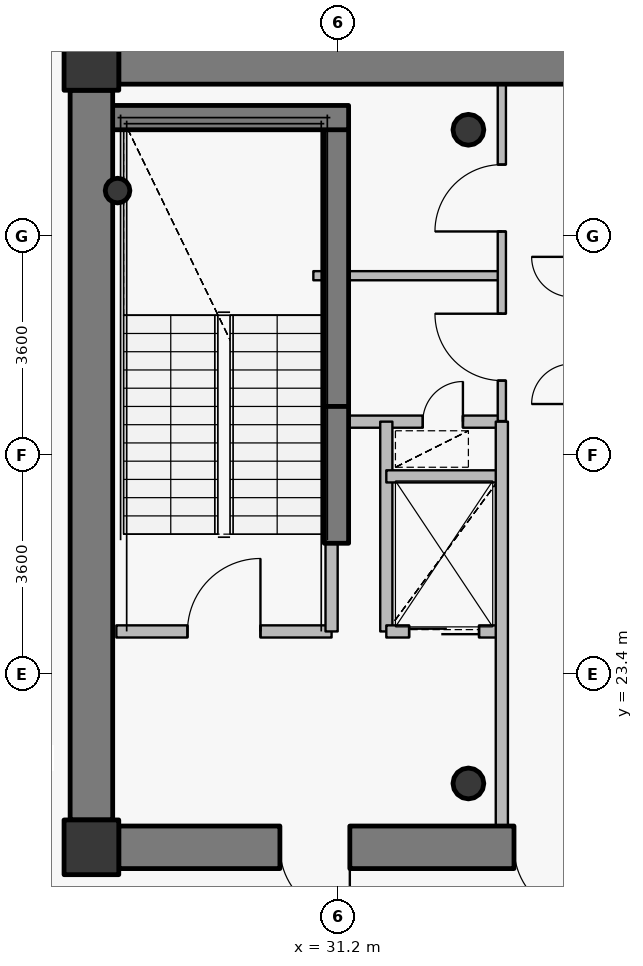
"""IFC4 building model, lengths in metres.
Left out: names, types, materials, properties, quantities, classifications, styles, units other than length and angle.
Written with IfcOpenShell. Run it as: python <this file> out.ifc"""

import sys

from ifc_helpers import new_model, si_unit, direction, frame, frame_2d, origin, origin_2d, place, context, subcontext, project, spatial, rectangle, hollow_circle, extrude, source, transform, mapped, element, fill, save


model = new_model("IFC4")
c1 = context("Model", 3, precision=1e-05, world=origin(), true_north=direction((0.0, 1.0)))
c2 = subcontext(c1, "Body", "Model", "MODEL_VIEW")
j1 = project(units=[si_unit("LENGTHUNIT", "METRE"), si_unit("PLANEANGLEUNIT", "RADIAN")], contexts=[c1])
p1 = place(None, origin())
s1 = spatial("IfcSite", under=j1, at=p1, CompositionType="ELEMENT")
p2 = place(p1, origin())
s2 = spatial("IfcBuilding", under=s1, at=p2, CompositionType="ELEMENT")
p3 = place(p2, frame((0.0, 0.0, 335.4)))
s3 = spatial("IfcBuildingStorey", under=s2, at=p3, CompositionType="ELEMENT", Elevation=335.4)
for number, where, z_axis, x_axis in (
    (1, (27.15, 20.55, 0.0), (0.0, 0.0, 1.0), (1.0, 0.0, 0.0)),
    (2, (27.15, 33.45, 0.0), (0.0, 0.0, 1.0), (1.0, 0.0, 0.0)),
):
    element("IfcColumn", number, at=place(p3, frame(where, z_axis=z_axis, x_axis=x_axis)), inside=s3, PredefinedType="COLUMN", context=c2, shape_type="SweptSolid", body=[
        extrude(rectangle(XDim=0.9, YDim=0.9, at=origin_2d()), origin(), (0.0, 0.0, 1.0), 3.8),
    ])
for number, where, z_axis, x_axis in (
    (3, (33.35, 21.6, 0.0), (0.0, 0.0, 1.0), (1.0, 0.0, 0.0)),
    (4, (33.35, 32.35, 0.0), (0.0, 0.0, 1.0), (1.0, 0.0, 0.0)),
):
    element("IfcColumn", number, at=place(p3, frame(where, z_axis=z_axis, x_axis=x_axis)), inside=s3, PredefinedType="COLUMN", context=c2, shape_type="SweptSolid", body=[
        extrude(hollow_circle(Radius=0.254, WallThickness=0.02, at=origin_2d()), origin(), (0.0, 0.0, 1.0), 3.8),
    ])
p4 = place(p3, frame((31.18, 27.8, 0.0), z_axis=(0.0, 0.0, 1.0), x_axis=(0.0, 1.0, 0.0)))
e5 = element("IfcWall", 5, at=p4, inside=s3, PredefinedType="SHEAR", context=c2, shape_type="SweptSolid", body=[
    extrude(rectangle(XDim=4.75, YDim=0.4, at=frame_2d((2.375, 0.0))), origin(), (0.0, 0.0, 1.0), 3.8),
])
p5 = place(p3, frame((27.25, 32.55, 0.0), z_axis=(0.0, 0.0, 1.0), x_axis=(1.0, 0.0, 0.0)))
e6 = element("IfcWall", 6, at=p5, inside=s3, PredefinedType="SHEAR", context=c2, shape_type="SweptSolid", body=[
    extrude(rectangle(XDim=4.13, YDim=0.4, at=frame_2d((2.065, 0.0))), origin(), (0.0, 0.0, 1.0), 3.8),
])
p6 = place(p3, frame((27.58, 31.35, 0.0), z_axis=(0.0, 0.0, 1.0), x_axis=(1.0, 0.0, 0.0)))
e7 = element("IfcColumn", 7, at=p6, inside=s3, PredefinedType="COLUMN", context=c2, shape_type="SweptSolid", body=[
    extrude(hollow_circle(Radius=0.203, WallThickness=0.016, at=origin_2d()), origin(), (0.0, 0.0, 1.0), 3.8),
])
p7 = place(p3, frame((27.6, 33.45, 0.0), z_axis=(0.0, 0.0, 1.0), x_axis=(1.0, 0.0, 0.0)))
e8 = element("IfcWall", 8, at=p7, inside=s3, PredefinedType="SHEAR", context=c2, shape_type="SweptSolid", body=[
    extrude(rectangle(XDim=16.8, YDim=0.7, at=frame_2d((8.4, 0.0))), origin(), (0.0, 0.0, 1.0), 3.1),
])
p8 = place(p7, frame((12.85, 0.0, 0.0)))
e9 = element("IfcOpeningElement", 9, at=p8, cuts=e8, PredefinedType="OPENING", context=c2, shape_type="SweptSolid", body=[
    extrude(rectangle(XDim=1.15, YDim=2.15, at=origin_2d()), frame((0.575, 0.36, 1.075), z_axis=(0.0, -1.0, 0.0), x_axis=(1.0, 0.0, 0.0)), (0.0, 0.0, 1.0), 0.72),
])
p9 = place(p3, frame((44.4, 20.55, 0.0), z_axis=(0.0, 0.0, 1.0), x_axis=(-1.0, 0.0, 0.0)))
e10 = element("IfcWall", 10, at=p9, inside=s3, PredefinedType="SHEAR", context=c2, shape_type="SweptSolid", body=[
    extrude(rectangle(XDim=16.8, YDim=0.7, at=frame_2d((8.4, 0.0))), origin(), (0.0, 0.0, 1.0), 3.1),
])
p10 = place(p9, frame((13.0, 0.0, 0.0)))
e11 = element("IfcOpeningElement", 11, at=p10, cuts=e10, PredefinedType="OPENING", context=c2, shape_type="SweptSolid", body=[
    extrude(rectangle(XDim=1.15, YDim=2.15, at=origin_2d()), frame((0.575, 0.36, 1.075), z_axis=(0.0, -1.0, 0.0), x_axis=(1.0, 0.0, 0.0)), (0.0, 0.0, 1.0), 0.72),
])
p11 = place(p9, frame((9.15, 0.0, 0.0)))
e12 = element("IfcOpeningElement", 12, at=p11, cuts=e10, PredefinedType="OPENING", context=c2, shape_type="SweptSolid", body=[
    extrude(rectangle(XDim=1.15, YDim=2.15, at=origin_2d()), frame((0.575, 0.36, 1.075), z_axis=(0.0, -1.0, 0.0), x_axis=(1.0, 0.0, 0.0)), (0.0, 0.0, 1.0), 0.72),
])
p12 = place(p3, frame((27.15, 21.0, 0.0), z_axis=(0.0, 0.0, 1.0), x_axis=(0.0, 1.0, 0.0)))
e13 = element("IfcWall", 13, at=p12, inside=s3, PredefinedType="SHEAR", context=c2, shape_type="SweptSolid", body=[
    extrude(rectangle(XDim=12.0, YDim=0.7, at=frame_2d((6.0, 0.0))), origin(), (0.0, 0.0, 1.0), 3.1),
])
p13 = place(p3, frame((31.18, 25.55, 0.0), z_axis=(0.0, 0.0, 1.0), x_axis=(0.0, 1.0, 0.0)))
e14 = element("IfcWall", 14, at=p13, inside=s3, PredefinedType="SHEAR", context=c2, shape_type="SweptSolid", body=[
    extrude(rectangle(XDim=2.25, YDim=0.4, at=frame_2d((1.125, 0.0))), origin(), (0.0, 0.0, 1.0), 3.15),
])
p14 = place(p3, frame((27.56, 24.1, 0.0), z_axis=(0.0, 0.0, 1.0), x_axis=(1.0, 0.0, 0.0)))
e15 = element("IfcWall", 15, at=p14, inside=s3, PredefinedType="PARTITIONING", context=c2, shape_type="SweptSolid", body=[
    extrude(rectangle(XDim=3.54, YDim=0.2, at=frame_2d((1.77, 0.0))), origin(), (0.0, 0.0, 1.0), 3.55),
])
p15 = place(p14, frame((1.17, 0.0, 0.0)))
e16 = element("IfcOpeningElement", 16, at=p15, cuts=e15, PredefinedType="OPENING", context=c2, shape_type="SweptSolid", body=[
    extrude(rectangle(XDim=1.2, YDim=2.15, at=origin_2d()), frame((0.6, 0.11, 1.075), z_axis=(0.0, -1.0, 0.0), x_axis=(1.0, 0.0, 0.0)), (0.0, 0.0, 1.0), 0.22),
])
p16 = place(p3, frame((30.8, 29.95, 0.0), z_axis=(0.0, 0.0, 1.0), x_axis=(1.0, 0.0, 0.0)))
e17 = element("IfcWall", 17, at=p16, inside=s3, PredefinedType="PARTITIONING", context=c2, shape_type="SweptSolid", body=[
    extrude(rectangle(XDim=3.1, YDim=0.15, at=frame_2d((1.55, 0.0))), origin(), (0.0, 0.0, 1.0), 3.135),
])
p17 = place(p3, frame((31.1, 24.1, 0.0), z_axis=(0.0, 0.0, 1.0), x_axis=(0.0, 1.0, 0.0)))
e18 = element("IfcWall", 18, at=p17, inside=s3, PredefinedType="PARTITIONING", context=c2, shape_type="SweptSolid", body=[
    extrude(rectangle(XDim=1.44, YDim=0.2, at=frame_2d((0.72, 0.0))), origin(), (0.0, 0.0, 1.0), 3.55),
])
p18 = place(p3, frame((31.1, 27.55, 0.0), z_axis=(0.0, 0.0, 1.0), x_axis=(1.0, 0.0, 0.0)))
e19 = element("IfcWall", 19, at=p18, inside=s3, PredefinedType="PARTITIONING", context=c2, shape_type="SweptSolid", body=[
    extrude(rectangle(XDim=2.8, YDim=0.2, at=frame_2d((1.4, 0.0))), origin(), (0.0, 0.0, 1.0), 3.135),
])
p19 = place(p18, frame((1.5, 0.0, 0.0)))
e20 = element("IfcOpeningElement", 20, at=p19, cuts=e19, PredefinedType="OPENING", context=c2, shape_type="SweptSolid", body=[
    extrude(rectangle(XDim=0.66, YDim=2.05, at=origin_2d()), frame((0.33, 0.11, 1.025), z_axis=(0.0, -1.0, 0.0), x_axis=(1.0, 0.0, 0.0)), (0.0, 0.0, 1.0), 0.22),
])
p20 = place(p3, frame((32.0, 24.1, 0.0), z_axis=(0.0, 0.0, 1.0), x_axis=(0.0, 1.0, 0.0)))
e21 = element("IfcWall", 21, at=p20, inside=s3, PredefinedType="PARTITIONING", context=c2, shape_type="SweptSolid", body=[
    extrude(rectangle(XDim=3.45, YDim=0.2, at=frame_2d((1.725, 0.0))), origin(), (0.0, 0.0, 1.0), 3.55),
])
p21 = place(p3, frame((32.0, 24.1, 0.0), z_axis=(0.0, 0.0, 1.0), x_axis=(1.0, 0.0, 0.0)))
e22 = element("IfcWall", 22, at=p21, inside=s3, PredefinedType="PARTITIONING", context=c2, shape_type="SweptSolid", body=[
    extrude(rectangle(XDim=1.9, YDim=0.2, at=frame_2d((0.95, 0.0))), origin(), (0.0, 0.0, 1.0), 3.135),
])
p22 = place(p21, frame((0.375, 0.0, 0.0)))
e23 = element("IfcOpeningElement", 23, at=p22, cuts=e22, PredefinedType="OPENING", context=c2, shape_type="SweptSolid", body=[
    extrude(rectangle(XDim=1.15, YDim=2.15, at=origin_2d()), frame((0.575, 0.11, 1.075), z_axis=(0.0, -1.0, 0.0), x_axis=(1.0, 0.0, 0.0)), (0.0, 0.0, 1.0), 0.22),
])
p23 = place(p3, frame((32.0, 26.65, 0.0), z_axis=(0.0, 0.0, 1.0), x_axis=(1.0, 0.0, 0.0)))
e24 = element("IfcWall", 24, at=p23, inside=s3, PredefinedType="PARTITIONING", context=c2, shape_type="SweptSolid", body=[
    extrude(rectangle(XDim=1.9, YDim=0.2, at=frame_2d((0.95, 0.0))), origin(), (0.0, 0.0, 1.0), 3.135),
])
p24 = place(p3, frame((33.9, 20.9, 0.0), z_axis=(0.0, 0.0, 1.0), x_axis=(0.0, 1.0, 0.0)))
e25 = element("IfcWall", 25, at=p24, inside=s3, PredefinedType="PARTITIONING", context=c2, shape_type="SweptSolid", body=[
    extrude(rectangle(XDim=6.65, YDim=0.2, at=frame_2d((3.325, 0.0))), origin(), (0.0, 0.0, 1.0), 3.135),
])
p25 = place(p3, frame((33.9, 27.56, 0.0), z_axis=(0.0, 0.0, 1.0), x_axis=(0.0, 1.0, 0.0)))
e26 = element("IfcWall", 26, at=p25, inside=s3, PredefinedType="PARTITIONING", context=c2, shape_type="SweptSolid", body=[
    extrude(rectangle(XDim=5.54, YDim=0.135, at=frame_2d((2.77, 0.0))), origin(), (0.0, 0.0, 1.0), 3.135),
])
p26 = place(p25, frame((0.665, 0.0, 0.0)))
e27 = element("IfcOpeningElement", 27, at=p26, cuts=e26, PredefinedType="OPENING", context=c2, shape_type="SweptSolid", body=[
    extrude(rectangle(XDim=1.1, YDim=2.15, at=origin_2d()), frame((0.55, 0.078, 1.075), z_axis=(0.0, -1.0, 0.0), x_axis=(1.0, 0.0, 0.0)), (0.0, 0.0, 1.0), 0.155),
])
p27 = place(p25, frame((3.117, 0.0, 0.0)))
e28 = element("IfcOpeningElement", 28, at=p27, cuts=e26, PredefinedType="OPENING", context=c2, shape_type="SweptSolid", body=[
    extrude(rectangle(XDim=1.1, YDim=2.15, at=origin_2d()), frame((0.55, 0.078, 1.075), z_axis=(0.0, -1.0, 0.0), x_axis=(1.0, 0.0, 0.0)), (0.0, 0.0, 1.0), 0.155),
])
p28 = place(p3, frame((26.8, 33.492, 0.0), z_axis=(0.0, 0.0, 1.0), x_axis=(0.0, -1.0, 0.0)))
e29 = element("IfcWall", 29, at=p28, inside=s3, PredefinedType="PARTITIONING", context=c2, shape_type="SweptSolid", body=[
    extrude(rectangle(XDim=0.482, YDim=0.135, at=frame_2d((0.241, 0.0))), origin(), (0.0, 0.0, 1.0), 3.55),
])
p29 = place(p3, frame((26.8, 20.99, 0.0), z_axis=(0.0, 0.0, 1.0), x_axis=(0.0, -1.0, 0.0)))
e30 = element("IfcWall", 30, at=p29, inside=s3, PredefinedType="PARTITIONING", context=c2, shape_type="SweptSolid", body=[
    extrude(rectangle(XDim=0.79, YDim=0.135, at=frame_2d((0.395, 0.0))), origin(), (0.0, 0.0, 1.0), 3.085),
])
p30 = place(p3, frame((27.107, 20.2, 0.0), z_axis=(0.0, 0.0, 1.0), x_axis=(1.0, 0.0, 0.0)))
e31 = element("IfcWall", 31, at=p30, inside=s3, PredefinedType="PARTITIONING", context=c2, shape_type="SweptSolid", body=[
    extrude(rectangle(XDim=0.483, YDim=0.135, at=frame_2d((0.241, 0.0))), origin(), (0.0, 0.0, 1.0), 3.085),
])
m1 = source(origin(), c2, "Body", "SweptSolid", [
    extrude(rectangle(XDim=1.15, YDim=2.15, at=origin_2d()), frame((0.575, 0.025, 1.075), z_axis=(0.0, -1.0, 0.0), x_axis=(1.0, 0.0, 0.0)), (0.0, 0.0, 1.0), 0.05),
])
p31 = place(p10, origin())
e32 = element("IfcDoor", 32, at=p31, inside=s3, OperationType="SINGLE_SWING_LEFT", PredefinedType="DOOR", context=c2, shape_type="MappedRepresentation", body=[
    mapped(m1, transform((0.0, 0.0, 0.0), x_axis=(1.0, 0.0, 0.0), y_axis=(0.0, 1.0, 0.0), z_axis=(0.0, 0.0, 1.0), scale=1.0)),
])
fill(e11, e32)
p32 = place(p11, origin())
e33 = element("IfcDoor", 33, at=p32, inside=s3, OperationType="SINGLE_SWING_LEFT", PredefinedType="DOOR", context=c2, shape_type="MappedRepresentation", body=[
    mapped(m1, transform((0.0, 0.0, 0.0), x_axis=(1.0, 0.0, 0.0), y_axis=(0.0, 1.0, 0.0), z_axis=(0.0, 0.0, 1.0), scale=1.0)),
])
fill(e12, e33)
m2 = source(origin(), c2, "Body", "SweptSolid", [
    extrude(rectangle(XDim=1.2, YDim=2.15, at=origin_2d()), frame((0.6, 0.025, 1.075), z_axis=(0.0, -1.0, 0.0), x_axis=(1.0, 0.0, 0.0)), (0.0, 0.0, 1.0), 0.05),
])
p33 = place(p15, origin())
e34 = element("IfcDoor", 34, at=p33, inside=s3, OperationType="SINGLE_SWING_RIGHT", PredefinedType="DOOR", context=c2, shape_type="MappedRepresentation", body=[
    mapped(m2, transform((0.0, 0.0, 0.0), x_axis=(1.0, 0.0, 0.0), y_axis=(0.0, 1.0, 0.0), z_axis=(0.0, 0.0, 1.0), scale=1.0)),
])
fill(e16, e34)
m3 = source(origin(), c2, "Body", "SweptSolid", [
    extrude(rectangle(XDim=1.15, YDim=2.15, at=origin_2d()), frame((0.575, 0.025, 1.075), z_axis=(0.0, -1.0, 0.0), x_axis=(1.0, 0.0, 0.0)), (0.0, 0.0, 1.0), 0.05),
])
p34 = place(p22, origin())
e35 = element("IfcDoor", 35, at=p34, inside=s3, OperationType="DOUBLE_DOOR_SLIDING", PredefinedType="USERDEFINED", context=c2, shape_type="MappedRepresentation", body=[
    mapped(m3, transform((0.0, 0.0, 0.0), x_axis=(1.0, 0.0, 0.0), y_axis=(0.0, 1.0, 0.0), z_axis=(0.0, 0.0, 1.0), scale=1.0)),
])
fill(e23, e35)
m4 = source(origin(), c2, "Body", "SweptSolid", [
    extrude(rectangle(XDim=1.1, YDim=2.15, at=origin_2d()), frame((0.55, 0.025, 1.075), z_axis=(0.0, -1.0, 0.0), x_axis=(1.0, 0.0, 0.0)), (0.0, 0.0, 1.0), 0.05),
])
p35 = place(p26, origin())
e36 = element("IfcDoor", 36, at=p35, inside=s3, OperationType="SINGLE_SWING_RIGHT", PredefinedType="DOOR", context=c2, shape_type="MappedRepresentation", body=[
    mapped(m4, transform((0.0, 0.0, 0.0), x_axis=(1.0, 0.0, 0.0), y_axis=(0.0, 1.0, 0.0), z_axis=(0.0, 0.0, 1.0), scale=1.0)),
])
fill(e27, e36)
p36 = place(p27, origin())
e37 = element("IfcDoor", 37, at=p36, inside=s3, OperationType="SINGLE_SWING_LEFT", PredefinedType="DOOR", context=c2, shape_type="MappedRepresentation", body=[
    mapped(m4, transform((0.0, 0.0, 0.0), x_axis=(1.0, 0.0, 0.0), y_axis=(0.0, 1.0, 0.0), z_axis=(0.0, 0.0, 1.0), scale=1.0)),
])
fill(e28, e37)
m5 = source(origin(), c2, "Body", "SweptSolid", [
    extrude(rectangle(XDim=0.66, YDim=2.05, at=origin_2d()), frame((0.33, 0.025, 1.025), z_axis=(0.0, -1.0, 0.0), x_axis=(1.0, 0.0, 0.0)), (0.0, 0.0, 1.0), 0.05),
])
p37 = place(p19, origin())
e38 = element("IfcDoor", 38, at=p37, inside=s3, OperationType="SINGLE_SWING_RIGHT", PredefinedType="USERDEFINED", context=c2, shape_type="MappedRepresentation", body=[
    mapped(m5, transform((0.0, 0.0, 0.0), x_axis=(1.0, 0.0, 0.0), y_axis=(0.0, 1.0, 0.0), z_axis=(0.0, 0.0, 1.0), scale=1.0)),
])
fill(e20, e38)
save(model, sys.argv[1])
